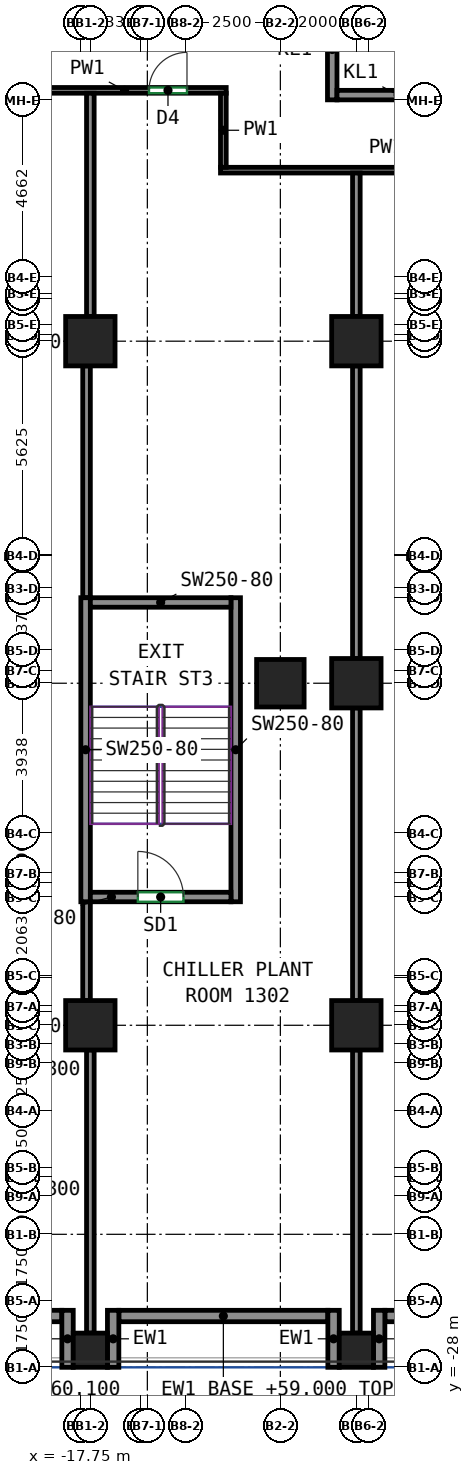
"""IFC4 building model, lengths in metres.
Left out: names, types, materials, properties, quantities, classifications, styles, units other than length and angle.
Written with IfcOpenShell. Run it as: python <this file> out.ifc"""

import sys

from ifc_helpers import new_model, si_unit, direction, frame, frame_2d, origin, origin_2d, place, context, subcontext, project, spatial, rectangle, extrude, source, transform, mapped, element, fill, save


model = new_model("IFC4")
c1 = context("Model", 3, precision=1e-05, world=origin(), true_north=direction((0.0, 1.0)))
c2 = subcontext(c1, "Body", "Model", "MODEL_VIEW")
j1 = project(units=[si_unit("LENGTHUNIT", "METRE"), si_unit("PLANEANGLEUNIT", "RADIAN")], contexts=[c1])
p1 = place(None, origin())
s1 = spatial("IfcSite", under=j1, at=p1, CompositionType="ELEMENT")
p2 = place(p1, origin())
s2 = spatial("IfcBuilding", under=s1, at=p2, CompositionType="ELEMENT")
p3 = place(p2, frame((0.0, 0.0, 59.0)))
s3 = spatial("IfcBuildingStorey", under=s2, at=p3, CompositionType="ELEMENT", Elevation=59.0)
m1 = source(origin(), c2, "Body", "SweptSolid", [
    extrude(rectangle(XDim=0.9, YDim=0.9, at=origin_2d()), origin(), (0.0, 0.0, 1.0), 2.3),
])
p4 = place(p3, frame((-17.5, -27.55, 0.0), z_axis=(0.0, 0.0, 1.0), x_axis=(1.0, 0.0, 0.0)))
e1 = element("IfcColumn", 1, at=p4, inside=s3, PredefinedType="COLUMN", context=c2, shape_type="MappedRepresentation", body=[
    mapped(m1, transform((0.0, 0.0, 0.0))),
])
m2 = source(origin(), c2, "Body", "SweptSolid", [
    extrude(rectangle(XDim=1.3, YDim=1.3, at=origin_2d()), origin(), (0.0, 0.0, 1.0), 2.3),
])
for number, where, z_axis, x_axis in (
    (2, (-17.5, -19.0, 0.0), (0.0, 0.0, 1.0), (1.0, 0.0, 0.0)),
    (3, (-17.5, -1.0, 0.0), (0.0, 0.0, 1.0), (1.0, 0.0, 0.0)),
):
    element("IfcColumn", number, at=place(p3, frame(where, z_axis=z_axis, x_axis=x_axis)), inside=s3, PredefinedType="COLUMN", context=c2, shape_type="MappedRepresentation", body=[
        mapped(m2, transform((0.0, 0.0, 0.0))),
    ])
p5 = place(p3, frame((-10.5, -27.55, 0.0), z_axis=(0.0, 0.0, 1.0), x_axis=(1.0, 0.0, 0.0)))
e4 = element("IfcColumn", 4, at=p5, inside=s3, PredefinedType="COLUMN", context=c2, shape_type="MappedRepresentation", body=[
    mapped(m1, transform((0.0, 0.0, 0.0))),
])
for number, where, z_axis, x_axis in (
    (5, (-10.5, -19.0, 0.0), (0.0, 0.0, 1.0), (1.0, 0.0, 0.0)),
    (6, (-10.5, -10.0, 0.0), (0.0, 0.0, 1.0), (1.0, 0.0, 0.0)),
    (7, (-10.5, -1.0, 0.0), (0.0, 0.0, 1.0), (1.0, 0.0, 0.0)),
):
    element("IfcColumn", number, at=place(p3, frame(where, z_axis=z_axis, x_axis=x_axis)), inside=s3, PredefinedType="COLUMN", context=c2, shape_type="MappedRepresentation", body=[
        mapped(m2, transform((0.0, 0.0, 0.0))),
    ])
m3 = source(origin(), c2, "Body", "SweptSolid", [
    extrude(rectangle(XDim=1.25, YDim=1.25, at=origin_2d()), origin(), (0.0, 0.0, 1.0), 3.8),
])
p6 = place(p3, frame((-12.5, -10.0, 0.0), z_axis=(0.0, 0.0, 1.0), x_axis=(1.0, 0.0, 0.0)))
e8 = element("IfcColumn", 8, at=p6, inside=s3, PredefinedType="COLUMN", context=c2, shape_type="MappedRepresentation", body=[
    mapped(m3, transform((0.0, 0.0, 0.0))),
])
m4 = source(origin(), c2, "Body", "SweptSolid", [
    extrude(rectangle(XDim=8.0, YDim=0.25, at=frame_2d((4.0, 0.0))), origin(), (0.0, 0.0, 1.0), 3.8),
])
for number, where, z_axis, x_axis in (
    (9, (-17.625, -15.75, 0.0), (0.0, 0.0, 1.0), (0.0, 1.0, 0.0)),
    (10, (-13.675, -15.75, 0.0), (0.0, 0.0, 1.0), (0.0, 1.0, 0.0)),
):
    element("IfcWall", number, at=place(p3, frame(where, z_axis=z_axis, x_axis=x_axis)), inside=s3, PredefinedType="SHEAR", context=c2, shape_type="MappedRepresentation", body=[
        mapped(m4, transform((0.0, 0.0, 0.0))),
    ])
m5 = source(origin(), c2, "Body", "SweptSolid", [
    extrude(rectangle(XDim=3.7, YDim=0.25, at=frame_2d((1.85, 0.0))), origin(), (0.0, 0.0, 1.0), 3.8),
])
p7 = place(p3, frame((-17.5, -15.625, 0.0), z_axis=(0.0, 0.0, 1.0), x_axis=(1.0, 0.0, 0.0)))
e11 = element("IfcWall", 11, at=p7, inside=s3, PredefinedType="SHEAR", context=c2, shape_type="MappedRepresentation", body=[
    mapped(m5, transform((0.0, 0.0, 0.0))),
])
p8 = place(p7, frame((1.25, 0.0, 0.0)))
e12 = element("IfcOpeningElement", 12, at=p8, cuts=e11, PredefinedType="OPENING", context=c2, shape_type="SweptSolid", body=[
    extrude(rectangle(XDim=1.2, YDim=2.1, at=frame_2d((0.6, 1.05))), frame((0.0, 0.135, 0.0), z_axis=(0.0, -1.0, 0.0), x_axis=(1.0, 0.0, 0.0)), (0.0, 0.0, 1.0), 0.27),
])
p9 = place(p3, frame((-17.5, -7.875, 0.0), z_axis=(0.0, 0.0, 1.0), x_axis=(1.0, 0.0, 0.0)))
e13 = element("IfcWall", 13, at=p9, inside=s3, PredefinedType="SHEAR", context=c2, shape_type="MappedRepresentation", body=[
    mapped(m5, transform((0.0, 0.0, 0.0))),
])
m6 = source(origin(), c2, "Body", "SweptSolid", [
    extrude(rectangle(XDim=5.5, YDim=0.3, at=frame_2d((2.75, 0.0))), origin(), (0.0, 0.0, 1.0), 1.1),
])
p10 = place(p3, frame((-23.75, -26.65, 0.0), z_axis=(0.0, 0.0, 1.0), x_axis=(1.0, 0.0, 0.0)))
e14 = element("IfcWall", 14, at=p10, inside=s3, PredefinedType="SOLIDWALL", context=c2, shape_type="MappedRepresentation", body=[
    mapped(m6, transform((0.0, 0.0, 0.0))),
])
m7 = source(origin(), c2, "Body", "SweptSolid", [
    extrude(rectangle(XDim=1.5, YDim=0.3, at=frame_2d((0.75, 0.0))), origin(), (0.0, 0.0, 1.0), 2.3),
])
p11 = place(p3, frame((-18.1, -28.0, 0.0), z_axis=(0.0, 0.0, 1.0), x_axis=(0.0, 1.0, 0.0)))
e15 = element("IfcWall", 15, at=p11, inside=s3, PredefinedType="SOLIDWALL", context=c2, shape_type="MappedRepresentation", body=[
    mapped(m7, transform((0.0, 0.0, 0.0))),
])
p12 = place(p3, frame((-16.75, -26.65, 0.0), z_axis=(0.0, 0.0, 1.0), x_axis=(1.0, 0.0, 0.0)))
e16 = element("IfcWall", 16, at=p12, inside=s3, PredefinedType="SOLIDWALL", context=c2, shape_type="MappedRepresentation", body=[
    mapped(m6, transform((0.0, 0.0, 0.0))),
])
for number, where, z_axis, x_axis in (
    (17, (-16.9, -28.0, 0.0), (0.0, 0.0, 1.0), (0.0, 1.0, 0.0)),
    (18, (-11.1, -28.0, 0.0), (0.0, 0.0, 1.0), (0.0, 1.0, 0.0)),
):
    element("IfcWall", number, at=place(p3, frame(where, z_axis=z_axis, x_axis=x_axis)), inside=s3, PredefinedType="SOLIDWALL", context=c2, shape_type="MappedRepresentation", body=[
        mapped(m7, transform((0.0, 0.0, 0.0))),
    ])
p13 = place(p3, frame((-9.75, -26.65, 0.0), z_axis=(0.0, 0.0, 1.0), x_axis=(1.0, 0.0, 0.0)))
e19 = element("IfcWall", 19, at=p13, inside=s3, PredefinedType="SOLIDWALL", context=c2, shape_type="MappedRepresentation", body=[
    mapped(m6, transform((0.0, 0.0, 0.0))),
])
p14 = place(p3, frame((-9.9, -28.0, 0.0), z_axis=(0.0, 0.0, 1.0), x_axis=(0.0, 1.0, 0.0)))
e20 = element("IfcWall", 20, at=p14, inside=s3, PredefinedType="SOLIDWALL", context=c2, shape_type="MappedRepresentation", body=[
    mapped(m7, transform((0.0, 0.0, 0.0))),
])
m8 = source(origin(), c2, "Body", "SweptSolid", [
    extrude(rectangle(XDim=2.65, YDim=0.25, at=frame_2d((1.325, 0.0))), origin(), (0.0, 0.0, 1.0), 3.8),
])
p15 = place(p3, frame((-11.135, 5.35, 0.0), z_axis=(0.0, 0.0, 1.0), x_axis=(0.0, 1.0, 0.0)))
e21 = element("IfcWall", 21, at=p15, inside=s3, PredefinedType="PARTITIONING", context=c2, shape_type="MappedRepresentation", body=[
    mapped(m8, transform((0.0, 0.0, 0.0))),
])
m9 = source(origin(), c2, "Body", "SweptSolid", [
    extrude(rectangle(XDim=5.36, YDim=0.25, at=frame_2d((2.68, 0.0))), origin(), (0.0, 0.0, 1.0), 3.8),
])
p16 = place(p3, frame((-11.01, 5.475, 0.0), z_axis=(0.0, 0.0, 1.0), x_axis=(1.0, 0.0, 0.0)))
e22 = element("IfcWall", 22, at=p16, inside=s3, PredefinedType="PARTITIONING", context=c2, shape_type="MappedRepresentation", body=[
    mapped(m9, transform((0.0, 0.0, 0.0))),
])
p17 = place(p16, frame((2.28, 0.0, 0.0)))
e23 = element("IfcOpeningElement", 23, at=p17, cuts=e22, PredefinedType="OPENING", context=c2, shape_type="SweptSolid", body=[
    extrude(rectangle(XDim=0.8, YDim=2.0, at=frame_2d((0.4, 1.0))), frame((0.0, 0.135, 0.0), z_axis=(0.0, -1.0, 0.0), x_axis=(1.0, 0.0, 0.0)), (0.0, 0.0, 1.0), 0.27),
])
p18 = place(p3, frame((-19.275, 5.6, 0.0), z_axis=(0.0, 0.0, 1.0), x_axis=(1.0, 0.0, 0.0)))
e24 = element("IfcWall", 24, at=p18, inside=s3, PredefinedType="PARTITIONING", context=c2, shape_type="SweptSolid", body=[
    extrude(rectangle(XDim=5.35, YDim=0.15, at=frame_2d((2.675, 0.0))), origin(), (0.0, 0.0, 1.0), 3.8),
])
p19 = place(p18, frame((3.318, 0.0, 0.0)))
e25 = element("IfcOpeningElement", 25, at=p19, cuts=e24, PredefinedType="OPENING", context=c2, shape_type="SweptSolid", body=[
    extrude(rectangle(XDim=1.0, YDim=2.1, at=frame_2d((0.5, 1.05))), frame((0.0, 0.085, 0.0), z_axis=(0.0, -1.0, 0.0), x_axis=(1.0, 0.0, 0.0)), (0.0, 0.0, 1.0), 0.17),
])
p20 = place(p3, frame((-14.075, 3.5, 0.0), z_axis=(0.0, 0.0, 1.0), x_axis=(1.0, 0.0, 0.0)))
e26 = element("IfcWall", 26, at=p20, inside=s3, PredefinedType="PARTITIONING", context=c2, shape_type="SweptSolid", body=[
    extrude(rectangle(XDim=10.675, YDim=0.15, at=frame_2d((5.337, 0.0))), origin(), (0.0, 0.0, 1.0), 3.8),
])
p21 = place(p20, frame((8.874, 0.0, 0.0)))
e27 = element("IfcOpeningElement", 27, at=p21, cuts=e26, PredefinedType="OPENING", context=c2, shape_type="SweptSolid", body=[
    extrude(rectangle(XDim=1.0, YDim=2.1, at=frame_2d((0.5, 1.05))), frame((0.0, 0.085, 0.0), z_axis=(0.0, -1.0, 0.0), x_axis=(1.0, 0.0, 0.0)), (0.0, 0.0, 1.0), 0.17),
])
p22 = place(p3, frame((-14.0, 5.525, 0.0), z_axis=(0.0, 0.0, 1.0), x_axis=(0.0, -1.0, 0.0)))
e28 = element("IfcWall", 28, at=p22, inside=s3, PredefinedType="PARTITIONING", context=c2, shape_type="SweptSolid", body=[
    extrude(rectangle(XDim=1.95, YDim=0.15, at=frame_2d((0.975, 0.0))), origin(), (0.0, 0.0, 1.0), 3.8),
])
p23 = place(p3, frame((-17.5, -0.35, 0.0), z_axis=(0.0, 0.0, 1.0), x_axis=(0.0, 1.0, 0.0)))
e29 = element("IfcWall", 29, at=p23, inside=s3, PredefinedType="PARTITIONING", context=c2, shape_type="SweptSolid", body=[
    extrude(rectangle(XDim=5.874, YDim=0.2, at=frame_2d((2.937, 0.0))), origin(), (0.0, 0.0, 1.0), 3.8),
])
p24 = place(p3, frame((-17.6, -7.75, 0.0), z_axis=(0.0, 0.0, 1.0), x_axis=(0.0, 1.0, 0.0)))
e30 = element("IfcWall", 30, at=p24, inside=s3, PredefinedType="PARTITIONING", context=c2, shape_type="SweptSolid", body=[
    extrude(rectangle(XDim=6.1, YDim=0.2, at=frame_2d((3.05, 0.0))), origin(), (0.0, 0.0, 1.0), 3.8),
])
p25 = place(p3, frame((-17.6, -18.35, 0.0), z_axis=(0.0, 0.0, 1.0), x_axis=(0.0, 1.0, 0.0)))
e31 = element("IfcWall", 31, at=p25, inside=s3, PredefinedType="PARTITIONING", context=c2, shape_type="SweptSolid", body=[
    extrude(rectangle(XDim=2.6, YDim=0.2, at=frame_2d((1.3, 0.0))), origin(), (0.0, 0.0, 1.0), 3.8),
])
p26 = place(p3, frame((-17.5, -27.1, 0.0), z_axis=(0.0, 0.0, 1.0), x_axis=(0.0, 1.0, 0.0)))
e32 = element("IfcWall", 32, at=p26, inside=s3, PredefinedType="PARTITIONING", context=c2, shape_type="SweptSolid", body=[
    extrude(rectangle(XDim=7.45, YDim=0.2, at=frame_2d((3.725, 0.0))), origin(), (0.0, 0.0, 1.0), 3.8),
])
p27 = place(p3, frame((-10.5, -0.35, 0.0), z_axis=(0.0, 0.0, 1.0), x_axis=(0.0, 1.0, 0.0)))
e33 = element("IfcWall", 33, at=p27, inside=s3, PredefinedType="PARTITIONING", context=c2, shape_type="SweptSolid", body=[
    extrude(rectangle(XDim=3.774, YDim=0.2, at=frame_2d((1.887, 0.0))), origin(), (0.0, 0.0, 1.0), 3.8),
])
for number, where, z_axis, x_axis in (
    (34, (-10.5, -9.35, 0.0), (0.0, 0.0, 1.0), (0.0, 1.0, 0.0)),
    (35, (-10.5, -18.35, 0.0), (0.0, 0.0, 1.0), (0.0, 1.0, 0.0)),
):
    element("IfcWall", number, at=place(p3, frame(where, z_axis=z_axis, x_axis=x_axis)), inside=s3, PredefinedType="PARTITIONING", context=c2, shape_type="SweptSolid", body=[
        extrude(rectangle(XDim=7.7, YDim=0.2, at=frame_2d((3.85, 0.0))), origin(), (0.0, 0.0, 1.0), 3.8),
    ])
p28 = place(p3, frame((-10.5, -27.1, 0.0), z_axis=(0.0, 0.0, 1.0), x_axis=(0.0, 1.0, 0.0)))
e36 = element("IfcWall", 36, at=p28, inside=s3, PredefinedType="PARTITIONING", context=c2, shape_type="SweptSolid", body=[
    extrude(rectangle(XDim=7.45, YDim=0.2, at=frame_2d((3.725, 0.0))), origin(), (0.0, 0.0, 1.0), 3.8),
])
p29 = place(p8, origin())
e37 = element("IfcDoor", 37, at=p29, inside=s3, OperationType="DOUBLE_DOOR_SINGLE_SWING", PredefinedType="DOOR", context=c2, shape_type="SweptSolid", body=[
    extrude(rectangle(XDim=1.2, YDim=2.1, at=frame_2d((0.6, 1.05))), frame((0.0, 0.025, 0.0), z_axis=(0.0, -1.0, 0.0), x_axis=(1.0, 0.0, 0.0)), (0.0, 0.0, 1.0), 0.05),
])
fill(e12, e37)
p30 = place(p19, origin())
e38 = element("IfcDoor", 38, at=p30, inside=s3, OperationType="SINGLE_SWING_RIGHT", PredefinedType="DOOR", context=c2, shape_type="SweptSolid", body=[
    extrude(rectangle(XDim=1.0, YDim=2.1, at=frame_2d((0.5, 1.05))), frame((0.0, 0.025, 0.0), z_axis=(0.0, -1.0, 0.0), x_axis=(1.0, 0.0, 0.0)), (0.0, 0.0, 1.0), 0.05),
])
fill(e25, e38)
save(model, sys.argv[1])
